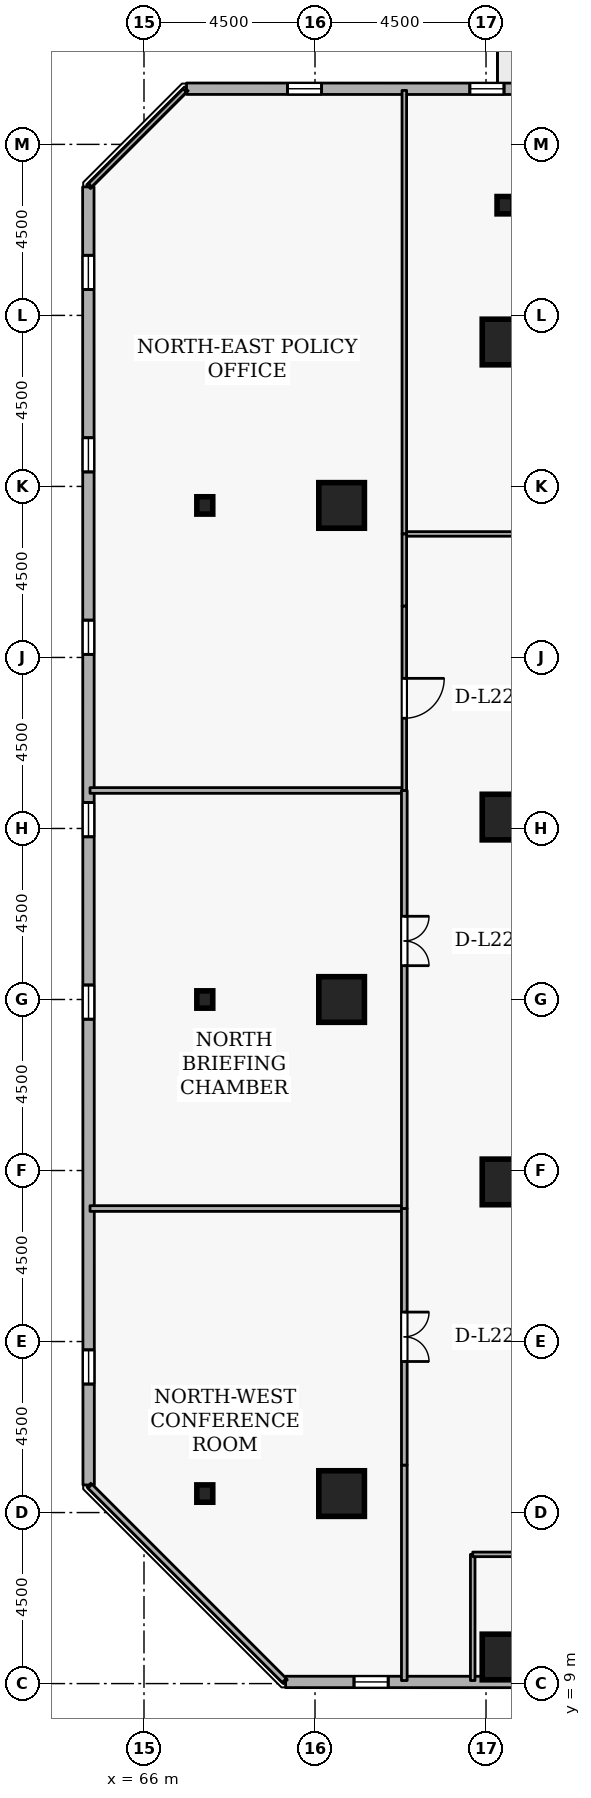
"""IFC4 building model, lengths in metres.
Left out: names, types, materials, properties, quantities, classifications, styles, units other than length and angle.
Written with IfcOpenShell. Run it as: python <this file> out.ifc"""

import sys

from ifc_helpers import new_model, si_unit, direction, frame, frame_2d, origin, origin_2d, place, context, subcontext, project, spatial, rectangle, i_section, extrude, element, fill, save


model = new_model("IFC4")
c1 = context("Model", 3, precision=1e-05, world=origin(), true_north=direction((0.0, 1.0)))
c2 = subcontext(c1, "Body", "Model", "MODEL_VIEW")
j1 = project(units=[si_unit("LENGTHUNIT", "METRE"), si_unit("PLANEANGLEUNIT", "RADIAN")], contexts=[c1])
p1 = place(None, origin())
s1 = spatial("IfcSite", under=j1, at=p1, CompositionType="ELEMENT")
p2 = place(p1, origin())
s2 = spatial("IfcBuilding", under=s1, at=p2, CompositionType="ELEMENT")
p3 = place(p2, frame((0.0, 0.0, 87.3)))
s3 = spatial("IfcBuildingStorey", under=s2, at=p3, CompositionType="ELEMENT", Elevation=87.3)
for number, where, z_axis, x_axis in (
    (1, (75.5, 44.3, 0.0), (0.0, 0.0, 1.0), (1.0, 0.0, 0.0)),
    (2, (71.2, 14.0, 0.0), (0.0, 0.0, 1.0), (1.0, 0.0, 0.0)),
    (3, (71.2, 27.0, 0.0), (0.0, 0.0, 1.0), (1.0, 0.0, 0.0)),
    (4, (71.2, 40.0, 0.0), (0.0, 0.0, 1.0), (1.0, 0.0, 0.0)),
    (5, (75.5, 9.7, 0.0), (0.0, 0.0, 1.0), (1.0, 0.0, 0.0)),
    (6, (75.5, 22.2, 0.0), (0.0, 0.0, 1.0), (1.0, 0.0, 0.0)),
    (7, (75.5, 31.8, 0.0), (0.0, 0.0, 1.0), (1.0, 0.0, 0.0)),
):
    element("IfcColumn", number, at=place(p3, frame(where, z_axis=z_axis, x_axis=x_axis)), inside=s3, PredefinedType="COLUMN", context=c2, shape_type="SweptSolid", body=[
        extrude(rectangle(XDim=1.2, YDim=1.2, at=origin_2d()), origin(), (0.0, 0.0, 1.0), 3.6),
    ])
for number, where, z_axis, x_axis in (
    (8, (75.5, 47.9, 0.0), (0.0, 0.0, 1.0), (1.0, 0.0, 0.0)),
    (9, (67.6, 14.0, 0.0), (0.0, 0.0, 1.0), (1.0, 0.0, 0.0)),
    (10, (67.6, 27.0, 0.0), (0.0, 0.0, 1.0), (1.0, 0.0, 0.0)),
    (11, (67.6, 40.0, 0.0), (0.0, 0.0, 1.0), (1.0, 0.0, 0.0)),
):
    element("IfcColumn", number, at=place(p3, frame(where, z_axis=z_axis, x_axis=x_axis)), inside=s3, PredefinedType="COLUMN", context=c2, shape_type="SweptSolid", body=[
        extrude(i_section(OverallWidth=0.418, OverallDepth=0.456, WebThickness=0.042, FlangeThickness=0.067, FilletRadius=0.015, at=origin_2d()), origin(), (0.0, 0.0, 1.0), 3.6),
    ])
p4 = place(p3, frame((69.726, 9.044, 0.0), z_axis=(0.0, 0.0, 1.0), x_axis=(0.999999970468, -0.000243032466, 0.0)))
e12 = element("IfcWall", 12, at=p4, inside=s3, PredefinedType="STANDARD", context=c2, shape_type="SweptSolid", body=[
    extrude(rectangle(XDim=34.155, YDim=0.3, at=frame_2d((17.078, 0.0))), origin(), (0.0, 0.0, 1.0), 2.7),
])
p5 = place(p4, frame((1.8, 0.0, 0.72)))
e13 = element("IfcOpeningElement", 13, at=p5, cuts=e12, PredefinedType="OPENING", context=c2, shape_type="SweptSolid", body=[
    extrude(rectangle(XDim=0.9, YDim=1.75, at=frame_2d((0.45, 0.875))), frame((0.0, 0.16, 0.0), z_axis=(0.0, -1.0, 0.0), x_axis=(1.0, 0.0, 0.0)), (0.0, 0.0, 1.0), 0.32),
])
p6 = place(p4, frame((11.4, 0.0, 0.72)))
e14 = element("IfcOpeningElement", 14, at=p6, cuts=e12, PredefinedType="OPENING", context=c2, shape_type="SweptSolid", body=[
    extrude(rectangle(XDim=0.9, YDim=1.75, at=frame_2d((0.45, 0.875))), frame((0.0, 0.16, 0.0), z_axis=(0.0, -1.0, 0.0), x_axis=(1.0, 0.0, 0.0)), (0.0, 0.0, 1.0), 0.32),
])
p7 = place(p4, frame((16.2, 0.0, 0.72)))
e15 = element("IfcOpeningElement", 15, at=p7, cuts=e12, PredefinedType="OPENING", context=c2, shape_type="SweptSolid", body=[
    extrude(rectangle(XDim=0.9, YDim=1.75, at=frame_2d((0.45, 0.875))), frame((0.0, 0.16, 0.0), z_axis=(0.0, -1.0, 0.0), x_axis=(1.0, 0.0, 0.0)), (0.0, 0.0, 1.0), 0.32),
])
p8 = place(p4, frame((21.0, 0.0, 0.72)))
e16 = element("IfcOpeningElement", 16, at=p8, cuts=e12, PredefinedType="OPENING", context=c2, shape_type="SweptSolid", body=[
    extrude(rectangle(XDim=0.9, YDim=1.75, at=frame_2d((0.45, 0.875))), frame((0.0, 0.16, 0.0), z_axis=(0.0, -1.0, 0.0), x_axis=(1.0, 0.0, 0.0)), (0.0, 0.0, 1.0), 0.32),
])
p9 = place(p4, frame((25.8, 0.0, 0.72)))
e17 = element("IfcOpeningElement", 17, at=p9, cuts=e12, PredefinedType="OPENING", context=c2, shape_type="SweptSolid", body=[
    extrude(rectangle(XDim=0.9, YDim=1.75, at=frame_2d((0.45, 0.875))), frame((0.0, 0.16, 0.0), z_axis=(0.0, -1.0, 0.0), x_axis=(1.0, 0.0, 0.0)), (0.0, 0.0, 1.0), 0.32),
])
p10 = place(p3, frame((101.274, 50.956, 0.0), z_axis=(0.0, 0.0, 1.0), x_axis=(-0.999999970468, 0.000243032466, 0.0)))
e18 = element("IfcWall", 18, at=p10, inside=s3, PredefinedType="STANDARD", context=c2, shape_type="SweptSolid", body=[
    extrude(rectangle(XDim=34.155, YDim=0.3, at=frame_2d((17.078, 0.0))), origin(), (0.0, 0.0, 1.0), 2.7),
])
p11 = place(p10, frame((18.878, 0.0, 0.0)))
e19 = element("IfcOpeningElement", 19, at=p11, cuts=e18, PredefinedType="OPENING", context=c2, shape_type="SweptSolid", body=[
    extrude(rectangle(XDim=1.0, YDim=2.08, at=frame_2d((0.5, 1.04))), frame((0.0, 0.16, 0.0), z_axis=(0.0, -1.0, 0.0), x_axis=(1.0, 0.0, 0.0)), (0.0, 0.0, 1.0), 0.32),
])
p12 = place(p10, frame((1.8, 0.0, 0.72)))
e20 = element("IfcOpeningElement", 20, at=p12, cuts=e18, PredefinedType="OPENING", context=c2, shape_type="SweptSolid", body=[
    extrude(rectangle(XDim=0.9, YDim=1.75, at=frame_2d((0.45, 0.875))), frame((0.0, 0.16, 0.0), z_axis=(0.0, -1.0, 0.0), x_axis=(1.0, 0.0, 0.0)), (0.0, 0.0, 1.0), 0.32),
])
p13 = place(p10, frame((6.6, 0.0, 0.72)))
e21 = element("IfcOpeningElement", 21, at=p13, cuts=e18, PredefinedType="OPENING", context=c2, shape_type="SweptSolid", body=[
    extrude(rectangle(XDim=0.9, YDim=1.75, at=frame_2d((0.45, 0.875))), frame((0.0, 0.16, 0.0), z_axis=(0.0, -1.0, 0.0), x_axis=(1.0, 0.0, 0.0)), (0.0, 0.0, 1.0), 0.32),
])
p14 = place(p10, frame((11.4, 0.0, 0.72)))
e22 = element("IfcOpeningElement", 22, at=p14, cuts=e18, PredefinedType="OPENING", context=c2, shape_type="SweptSolid", body=[
    extrude(rectangle(XDim=0.9, YDim=1.75, at=frame_2d((0.45, 0.875))), frame((0.0, 0.16, 0.0), z_axis=(0.0, -1.0, 0.0), x_axis=(1.0, 0.0, 0.0)), (0.0, 0.0, 1.0), 0.32),
])
p15 = place(p10, frame((16.2, 0.0, 0.72)))
e23 = element("IfcOpeningElement", 23, at=p15, cuts=e18, PredefinedType="OPENING", context=c2, shape_type="SweptSolid", body=[
    extrude(rectangle(XDim=0.9, YDim=1.75, at=frame_2d((0.45, 0.875))), frame((0.0, 0.16, 0.0), z_axis=(0.0, -1.0, 0.0), x_axis=(1.0, 0.0, 0.0)), (0.0, 0.0, 1.0), 0.32),
])
p16 = place(p10, frame((21.0, 0.0, 0.72)))
e24 = element("IfcOpeningElement", 24, at=p16, cuts=e18, PredefinedType="OPENING", context=c2, shape_type="SweptSolid", body=[
    extrude(rectangle(XDim=0.9, YDim=1.75, at=frame_2d((0.45, 0.875))), frame((0.0, 0.16, 0.0), z_axis=(0.0, -1.0, 0.0), x_axis=(1.0, 0.0, 0.0)), (0.0, 0.0, 1.0), 0.32),
])
p17 = place(p10, frame((25.8, 0.0, 0.72)))
e25 = element("IfcOpeningElement", 25, at=p17, cuts=e18, PredefinedType="OPENING", context=c2, shape_type="SweptSolid", body=[
    extrude(rectangle(XDim=0.9, YDim=1.75, at=frame_2d((0.45, 0.875))), frame((0.0, 0.16, 0.0), z_axis=(0.0, -1.0, 0.0), x_axis=(1.0, 0.0, 0.0)), (0.0, 0.0, 1.0), 0.32),
])
p18 = place(p10, frame((30.6, 0.0, 0.72)))
e26 = element("IfcOpeningElement", 26, at=p18, cuts=e18, PredefinedType="OPENING", context=c2, shape_type="SweptSolid", body=[
    extrude(rectangle(XDim=0.9, YDim=1.75, at=frame_2d((0.45, 0.875))), frame((0.0, 0.16, 0.0), z_axis=(0.0, -1.0, 0.0), x_axis=(1.0, 0.0, 0.0)), (0.0, 0.0, 1.0), 0.32),
])
p19 = place(p3, frame((64.535, 48.381, 0.0), z_axis=(0.0, 0.0, 1.0), x_axis=(0.000243032466, -0.999999970468, 0.0)))
e27 = element("IfcWall", 27, at=p19, inside=s3, PredefinedType="STANDARD", context=c2, shape_type="SweptSolid", body=[
    extrude(rectangle(XDim=34.155, YDim=0.3, at=frame_2d((17.078, 0.0))), origin(), (0.0, 0.0, 1.0), 2.7),
])
p20 = place(p19, frame((1.8, 0.0, 0.72)))
e28 = element("IfcOpeningElement", 28, at=p20, cuts=e27, PredefinedType="OPENING", context=c2, shape_type="SweptSolid", body=[
    extrude(rectangle(XDim=0.9, YDim=1.75, at=frame_2d((0.45, 0.875))), frame((0.0, 0.16, 0.0), z_axis=(0.0, -1.0, 0.0), x_axis=(1.0, 0.0, 0.0)), (0.0, 0.0, 1.0), 0.32),
])
p21 = place(p19, frame((6.6, 0.0, 0.72)))
e29 = element("IfcOpeningElement", 29, at=p21, cuts=e27, PredefinedType="OPENING", context=c2, shape_type="SweptSolid", body=[
    extrude(rectangle(XDim=0.9, YDim=1.75, at=frame_2d((0.45, 0.875))), frame((0.0, 0.16, 0.0), z_axis=(0.0, -1.0, 0.0), x_axis=(1.0, 0.0, 0.0)), (0.0, 0.0, 1.0), 0.32),
])
p22 = place(p19, frame((11.4, 0.0, 0.72)))
e30 = element("IfcOpeningElement", 30, at=p22, cuts=e27, PredefinedType="OPENING", context=c2, shape_type="SweptSolid", body=[
    extrude(rectangle(XDim=0.9, YDim=1.75, at=frame_2d((0.45, 0.875))), frame((0.0, 0.16, 0.0), z_axis=(0.0, -1.0, 0.0), x_axis=(1.0, 0.0, 0.0)), (0.0, 0.0, 1.0), 0.32),
])
p23 = place(p19, frame((16.2, 0.0, 0.72)))
e31 = element("IfcOpeningElement", 31, at=p23, cuts=e27, PredefinedType="OPENING", context=c2, shape_type="SweptSolid", body=[
    extrude(rectangle(XDim=0.9, YDim=1.75, at=frame_2d((0.45, 0.875))), frame((0.0, 0.16, 0.0), z_axis=(0.0, -1.0, 0.0), x_axis=(1.0, 0.0, 0.0)), (0.0, 0.0, 1.0), 0.32),
])
p24 = place(p19, frame((21.0, 0.0, 0.72)))
e32 = element("IfcOpeningElement", 32, at=p24, cuts=e27, PredefinedType="OPENING", context=c2, shape_type="SweptSolid", body=[
    extrude(rectangle(XDim=0.9, YDim=1.75, at=frame_2d((0.45, 0.875))), frame((0.0, 0.16, 0.0), z_axis=(0.0, -1.0, 0.0), x_axis=(1.0, 0.0, 0.0)), (0.0, 0.0, 1.0), 0.32),
])
p25 = place(p19, frame((30.6, 0.0, 0.72)))
e33 = element("IfcOpeningElement", 33, at=p25, cuts=e27, PredefinedType="OPENING", context=c2, shape_type="SweptSolid", body=[
    extrude(rectangle(XDim=0.9, YDim=1.75, at=frame_2d((0.45, 0.875))), frame((0.0, 0.16, 0.0), z_axis=(0.0, -1.0, 0.0), x_axis=(1.0, 0.0, 0.0)), (0.0, 0.0, 1.0), 0.32),
])
p26 = place(p3, frame((74.65, 9.08, 0.0), z_axis=(0.0, 0.0, 1.0), x_axis=(0.0, 1.0, 0.0)))
e34 = element("IfcWall", 34, at=p26, inside=s3, PredefinedType="PARTITIONING", context=c2, shape_type="SweptSolid", body=[
    extrude(rectangle(XDim=3.32, YDim=0.12, at=frame_2d((1.66, 0.0))), origin(), (0.0, 0.0, 1.0), 3.34),
])
p27 = place(p3, frame((74.65, 12.4, 0.0), z_axis=(0.0, 0.0, 1.0), x_axis=(1.0, 0.0, 0.0)))
e35 = element("IfcWall", 35, at=p27, inside=s3, PredefinedType="PARTITIONING", context=c2, shape_type="SweptSolid", body=[
    extrude(rectangle(XDim=4.802, YDim=0.12, at=frame_2d((2.401, 0.0))), origin(), (0.0, 0.0, 1.0), 3.34),
])
p28 = place(p3, frame((82.2, 39.25, 0.0), z_axis=(0.0, 0.0, 1.0), x_axis=(-1.0, 0.0, 0.0)))
e36 = element("IfcWall", 36, at=p28, inside=s3, PredefinedType="PARTITIONING", context=c2, shape_type="SweptSolid", body=[
    extrude(rectangle(XDim=9.35, YDim=0.12, at=frame_2d((4.675, 0.0))), origin(), (0.0, 0.0, 1.0), 3.34),
])
p29 = place(p28, frame((4.15, 0.0, 0.0)))
e37 = element("IfcOpeningElement", 37, at=p29, cuts=e36, PredefinedType="OPENING", context=c2, shape_type="SweptSolid", body=[
    extrude(rectangle(XDim=1.05, YDim=2.1, at=frame_2d((0.525, 1.05))), frame((0.0, 0.07, 0.0), z_axis=(0.0, -1.0, 0.0), x_axis=(1.0, 0.0, 0.0)), (0.0, 0.0, 1.0), 0.14),
])
p30 = place(p3, frame((72.85, 39.25, 0.0), z_axis=(0.0, 0.0, 1.0), x_axis=(0.0, 1.0, 0.0)))
e38 = element("IfcWall", 38, at=p30, inside=s3, PredefinedType="PARTITIONING", context=c2, shape_type="SweptSolid", body=[
    extrude(rectangle(XDim=11.67, YDim=0.12, at=frame_2d((5.835, 0.0))), origin(), (0.0, 0.0, 1.0), 3.34),
])
p31 = place(p3, frame((72.85, 14.75, 0.0), z_axis=(0.0, 0.0, 1.0), x_axis=(0.0, -1.0, 0.0)))
e39 = element("IfcWall", 39, at=p31, inside=s3, PredefinedType="PARTITIONING", context=c2, shape_type="SweptSolid", body=[
    extrude(rectangle(XDim=5.67, YDim=0.15, at=frame_2d((2.835, 0.0))), origin(), (0.0, 0.0, 1.0), 3.34),
])
p32 = place(p3, frame((69.693, 9.08, 0.0), z_axis=(0.0, 0.0, 1.0), x_axis=(-0.707106781187, 0.707106781187, 0.0)))
e40 = element("IfcWall", 40, at=p32, inside=s3, PredefinedType="PARTITIONING", context=c2, shape_type="SweptSolid", body=[
    extrude(rectangle(XDim=7.23, YDim=0.15, at=frame_2d((3.615, 0.0))), origin(), (0.0, 0.0, 1.0), 3.34),
])
p33 = place(p3, frame((64.58, 21.5, 0.0), z_axis=(0.0, 0.0, 1.0), x_axis=(1.0, 0.0, 0.0)))
e41 = element("IfcWall", 41, at=p33, inside=s3, PredefinedType="PARTITIONING", context=c2, shape_type="SweptSolid", body=[
    extrude(rectangle(XDim=8.27, YDim=0.15, at=frame_2d((4.135, 0.0))), origin(), (0.0, 0.0, 1.0), 3.34),
])
p34 = place(p3, frame((72.85, 21.5, 0.0), z_axis=(0.0, 0.0, 1.0), x_axis=(0.0, -1.0, 0.0)))
e42 = element("IfcWall", 42, at=p34, inside=s3, PredefinedType="PARTITIONING", context=c2, shape_type="SweptSolid", body=[
    extrude(rectangle(XDim=6.75, YDim=0.15, at=frame_2d((3.375, 0.0))), origin(), (0.0, 0.0, 1.0), 3.34),
])
p35 = place(p34, frame((2.725, 0.0, 0.0)))
e43 = element("IfcOpeningElement", 43, at=p35, cuts=e42, PredefinedType="OPENING", context=c2, shape_type="SweptSolid", body=[
    extrude(rectangle(XDim=1.3, YDim=2.12, at=frame_2d((0.65, 1.06))), frame((0.0, 0.085, 0.0), z_axis=(0.0, -1.0, 0.0), x_axis=(1.0, 0.0, 0.0)), (0.0, 0.0, 1.0), 0.17),
])
p36 = place(p3, frame((64.58, 32.5, 0.0), z_axis=(0.0, 0.0, 1.0), x_axis=(1.0, 0.0, 0.0)))
e44 = element("IfcWall", 44, at=p36, inside=s3, PredefinedType="PARTITIONING", context=c2, shape_type="SweptSolid", body=[
    extrude(rectangle(XDim=8.27, YDim=0.15, at=frame_2d((4.135, 0.0))), origin(), (0.0, 0.0, 1.0), 3.34),
])
p37 = place(p3, frame((72.85, 32.5, 0.0), z_axis=(0.0, 0.0, 1.0), x_axis=(0.0, -1.0, 0.0)))
e45 = element("IfcWall", 45, at=p37, inside=s3, PredefinedType="PARTITIONING", context=c2, shape_type="SweptSolid", body=[
    extrude(rectangle(XDim=11.0, YDim=0.15, at=frame_2d((5.5, 0.0))), origin(), (0.0, 0.0, 1.0), 3.34),
])
p38 = place(p37, frame((3.31, 0.0, 0.0)))
e46 = element("IfcOpeningElement", 46, at=p38, cuts=e45, PredefinedType="OPENING", context=c2, shape_type="SweptSolid", body=[
    extrude(rectangle(XDim=1.3, YDim=2.12, at=frame_2d((0.65, 1.06))), frame((0.0, 0.085, 0.0), z_axis=(0.0, -1.0, 0.0), x_axis=(1.0, 0.0, 0.0)), (0.0, 0.0, 1.0), 0.17),
])
p39 = place(p3, frame((64.58, 48.425, 0.0), z_axis=(0.0, 0.0, 1.0), x_axis=(0.707106781187, 0.707106781187, 0.0)))
e47 = element("IfcWall", 47, at=p39, inside=s3, PredefinedType="PARTITIONING", context=c2, shape_type="SweptSolid", body=[
    extrude(rectangle(XDim=3.528, YDim=0.12, at=frame_2d((1.764, 0.0))), origin(), (0.0, 0.0, 1.0), 3.34),
])
p40 = place(p3, frame((72.85, 39.25, 0.0), z_axis=(0.0, 0.0, 1.0), x_axis=(0.0, -1.0, 0.0)))
e48 = element("IfcWall", 48, at=p40, inside=s3, PredefinedType="PARTITIONING", context=c2, shape_type="SweptSolid", body=[
    extrude(rectangle(XDim=1.9, YDim=0.12, at=frame_2d((0.95, 0.0))), origin(), (0.0, 0.0, 1.0), 2.895),
])
p41 = place(p3, frame((72.85, 37.35, 0.0), z_axis=(0.0, 0.0, 1.0), x_axis=(0.0, -1.0, 0.0)))
e49 = element("IfcWall", 49, at=p41, inside=s3, PredefinedType="PARTITIONING", context=c2, shape_type="SweptSolid", body=[
    extrude(rectangle(XDim=4.85, YDim=0.12, at=frame_2d((2.425, 0.0))), origin(), (0.0, 0.0, 1.0), 2.895),
])
p42 = place(p41, frame((1.9, 0.0, 0.0)))
e50 = element("IfcOpeningElement", 50, at=p42, cuts=e49, PredefinedType="OPENING", context=c2, shape_type="SweptSolid", body=[
    extrude(rectangle(XDim=1.05, YDim=2.1, at=frame_2d((0.525, 1.05))), frame((0.0, 0.07, 0.0), z_axis=(0.0, -1.0, 0.0), x_axis=(1.0, 0.0, 0.0)), (0.0, 0.0, 1.0), 0.14),
])
p43 = place(p5, origin())
e51 = element("IfcWindow", 51, at=p43, inside=s3, PartitioningType="SINGLE_PANEL", PredefinedType="WINDOW", context=c2, shape_type="SweptSolid", body=[
    extrude(rectangle(XDim=0.9, YDim=1.75, at=frame_2d((0.45, 0.875))), frame((0.0, 0.03, 0.0), z_axis=(0.0, -1.0, 0.0), x_axis=(1.0, 0.0, 0.0)), (0.0, 0.0, 1.0), 0.06),
])
fill(e13, e51)
p44 = place(p17, origin())
e52 = element("IfcWindow", 52, at=p44, inside=s3, PartitioningType="SINGLE_PANEL", PredefinedType="WINDOW", context=c2, shape_type="SweptSolid", body=[
    extrude(rectangle(XDim=0.9, YDim=1.75, at=frame_2d((0.45, 0.875))), frame((0.0, 0.03, 0.0), z_axis=(0.0, -1.0, 0.0), x_axis=(1.0, 0.0, 0.0)), (0.0, 0.0, 1.0), 0.06),
])
fill(e25, e52)
p45 = place(p18, origin())
e53 = element("IfcWindow", 53, at=p45, inside=s3, PartitioningType="SINGLE_PANEL", PredefinedType="WINDOW", context=c2, shape_type="SweptSolid", body=[
    extrude(rectangle(XDim=0.9, YDim=1.75, at=frame_2d((0.45, 0.875))), frame((0.0, 0.03, 0.0), z_axis=(0.0, -1.0, 0.0), x_axis=(1.0, 0.0, 0.0)), (0.0, 0.0, 1.0), 0.06),
])
fill(e26, e53)
p46 = place(p20, origin())
e54 = element("IfcWindow", 54, at=p46, inside=s3, PartitioningType="SINGLE_PANEL", PredefinedType="WINDOW", context=c2, shape_type="SweptSolid", body=[
    extrude(rectangle(XDim=0.9, YDim=1.75, at=frame_2d((0.45, 0.875))), frame((0.0, 0.03, 0.0), z_axis=(0.0, -1.0, 0.0), x_axis=(1.0, 0.0, 0.0)), (0.0, 0.0, 1.0), 0.06),
])
fill(e28, e54)
p47 = place(p21, origin())
e55 = element("IfcWindow", 55, at=p47, inside=s3, PartitioningType="SINGLE_PANEL", PredefinedType="WINDOW", context=c2, shape_type="SweptSolid", body=[
    extrude(rectangle(XDim=0.9, YDim=1.75, at=frame_2d((0.45, 0.875))), frame((0.0, 0.03, 0.0), z_axis=(0.0, -1.0, 0.0), x_axis=(1.0, 0.0, 0.0)), (0.0, 0.0, 1.0), 0.06),
])
fill(e29, e55)
p48 = place(p22, origin())
e56 = element("IfcWindow", 56, at=p48, inside=s3, PartitioningType="SINGLE_PANEL", PredefinedType="WINDOW", context=c2, shape_type="SweptSolid", body=[
    extrude(rectangle(XDim=0.9, YDim=1.75, at=frame_2d((0.45, 0.875))), frame((0.0, 0.03, 0.0), z_axis=(0.0, -1.0, 0.0), x_axis=(1.0, 0.0, 0.0)), (0.0, 0.0, 1.0), 0.06),
])
fill(e30, e56)
p49 = place(p23, origin())
e57 = element("IfcWindow", 57, at=p49, inside=s3, PartitioningType="SINGLE_PANEL", PredefinedType="WINDOW", context=c2, shape_type="SweptSolid", body=[
    extrude(rectangle(XDim=0.9, YDim=1.75, at=frame_2d((0.45, 0.875))), frame((0.0, 0.03, 0.0), z_axis=(0.0, -1.0, 0.0), x_axis=(1.0, 0.0, 0.0)), (0.0, 0.0, 1.0), 0.06),
])
fill(e31, e57)
p50 = place(p24, origin())
e58 = element("IfcWindow", 58, at=p50, inside=s3, PartitioningType="SINGLE_PANEL", PredefinedType="WINDOW", context=c2, shape_type="SweptSolid", body=[
    extrude(rectangle(XDim=0.9, YDim=1.75, at=frame_2d((0.45, 0.875))), frame((0.0, 0.03, 0.0), z_axis=(0.0, -1.0, 0.0), x_axis=(1.0, 0.0, 0.0)), (0.0, 0.0, 1.0), 0.06),
])
fill(e32, e58)
p51 = place(p25, origin())
e59 = element("IfcWindow", 59, at=p51, inside=s3, PartitioningType="SINGLE_PANEL", PredefinedType="WINDOW", context=c2, shape_type="SweptSolid", body=[
    extrude(rectangle(XDim=0.9, YDim=1.75, at=frame_2d((0.45, 0.875))), frame((0.0, 0.03, 0.0), z_axis=(0.0, -1.0, 0.0), x_axis=(1.0, 0.0, 0.0)), (0.0, 0.0, 1.0), 0.06),
])
fill(e33, e59)
p52 = place(p35, origin())
e60 = element("IfcDoor", 60, at=p52, inside=s3, OperationType="DOUBLE_DOOR_SINGLE_SWING", PredefinedType="DOOR", context=c2, shape_type="SweptSolid", body=[
    extrude(rectangle(XDim=1.3, YDim=2.12, at=frame_2d((0.65, 1.06))), frame((0.0, 0.025, 0.0), z_axis=(0.0, -1.0, 0.0), x_axis=(1.0, 0.0, 0.0)), (0.0, 0.0, 1.0), 0.05),
])
fill(e43, e60)
p53 = place(p38, origin())
e61 = element("IfcDoor", 61, at=p53, inside=s3, OperationType="DOUBLE_DOOR_SINGLE_SWING", PredefinedType="DOOR", context=c2, shape_type="SweptSolid", body=[
    extrude(rectangle(XDim=1.3, YDim=2.12, at=frame_2d((0.65, 1.06))), frame((0.0, 0.025, 0.0), z_axis=(0.0, -1.0, 0.0), x_axis=(1.0, 0.0, 0.0)), (0.0, 0.0, 1.0), 0.05),
])
fill(e46, e61)
p54 = place(p42, origin())
e62 = element("IfcDoor", 62, at=p54, inside=s3, OperationType="SINGLE_SWING_LEFT", PredefinedType="DOOR", context=c2, shape_type="SweptSolid", body=[
    extrude(rectangle(XDim=1.05, YDim=2.1, at=frame_2d((0.525, 1.05))), frame((0.0, 0.025, 0.0), z_axis=(0.0, -1.0, 0.0), x_axis=(1.0, 0.0, 0.0)), (0.0, 0.0, 1.0), 0.05),
])
fill(e50, e62)
save(model, sys.argv[1])
